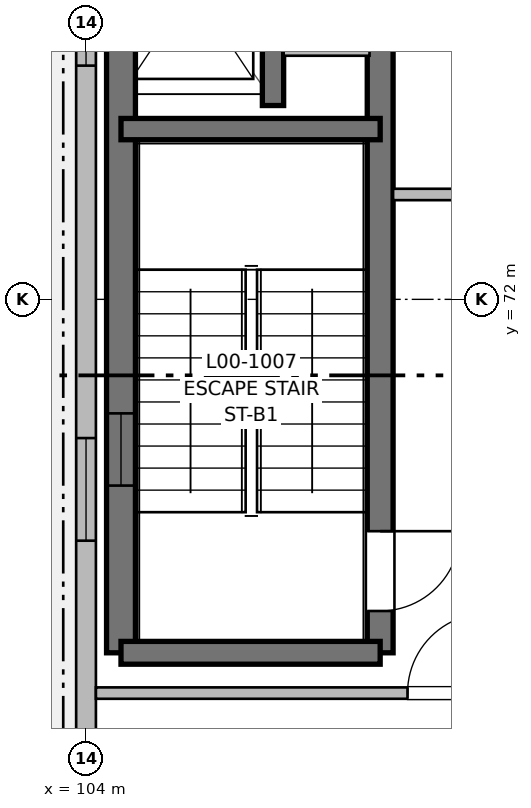
"""IFC4 building model, lengths in metres.
Left out: names, types, materials, properties, quantities, classifications, styles, units other than length and angle.
Written with IfcOpenShell. Run it as: python <this file> out.ifc"""

import sys

from ifc_helpers import new_model, si_unit, direction, frame, frame_2d, origin, place, context, subcontext, project, spatial, rectangle, extrude, element, fill, save


model = new_model("IFC4")
c1 = context("Model", 3, precision=1e-05, world=origin(), true_north=direction((0.0, 1.0)))
c2 = subcontext(c1, "Body", "Model", "MODEL_VIEW")
j1 = project(units=[si_unit("LENGTHUNIT", "METRE"), si_unit("PLANEANGLEUNIT", "RADIAN")], contexts=[c1])
p1 = place(None, origin())
s1 = spatial("IfcSite", under=j1, at=p1, CompositionType="ELEMENT")
p2 = place(p1, origin())
s2 = spatial("IfcBuilding", under=s1, at=p2, CompositionType="ELEMENT")
p3 = place(p2, origin())
s3 = spatial("IfcBuildingStorey", under=s2, at=p3, CompositionType="ELEMENT", Elevation=0.0)
p4 = place(p3, frame((104.46, 67.35, 0.0), z_axis=(0.0, 0.0, 1.0), x_axis=(0.0, 1.0, 0.0)))
e1 = element("IfcWall", 1, at=p4, inside=s3, PredefinedType="SHEAR", context=c2, shape_type="SweptSolid", body=[
    extrude(rectangle(XDim=12.45, YDim=0.38, at=frame_2d((6.225, 0.0))), origin(), (0.0, 0.0, 1.0), 4.16),
])
p5 = place(p4, frame((2.2, 0.0, 1.2)))
e2 = element("IfcOpeningElement", 2, at=p5, cuts=e1, PredefinedType="OPENING", context=c2, shape_type="SweptSolid", body=[
    extrude(rectangle(XDim=0.95, YDim=1.25, at=frame_2d((0.475, 0.625))), frame((0.0, 0.2, 0.0), z_axis=(0.0, -1.0, 0.0), x_axis=(1.0, 0.0, 0.0)), (0.0, 0.0, 1.0), 0.4),
])
p6 = place(p3, frame((107.87, 79.8, 0.0), z_axis=(0.0, 0.0, 1.0), x_axis=(0.0, -1.0, 0.0)))
e3 = element("IfcWall", 3, at=p6, inside=s3, PredefinedType="SHEAR", context=c2, shape_type="SweptSolid", body=[
    extrude(rectangle(XDim=12.45, YDim=0.34, at=frame_2d((6.225, 0.0))), origin(), (0.0, 0.0, 1.0), 4.16),
])
p7 = place(p6, frame((10.85, 0.0, 0.0)))
e4 = element("IfcOpeningElement", 4, at=p7, cuts=e3, PredefinedType="OPENING", context=c2, shape_type="SweptSolid", body=[
    extrude(rectangle(XDim=1.05, YDim=2.15, at=frame_2d((0.525, 1.075))), frame((0.0, 0.18, 0.0), z_axis=(0.0, -1.0, 0.0), x_axis=(1.0, 0.0, 0.0)), (0.0, 0.0, 1.0), 0.36),
])
p8 = place(p3, frame((107.87, 67.35, 0.0), z_axis=(0.0, 0.0, 1.0), x_axis=(-1.0, 0.0, 0.0)))
e5 = element("IfcWall", 5, at=p8, inside=s3, PredefinedType="SHEAR", context=c2, shape_type="SweptSolid", body=[
    extrude(rectangle(XDim=3.41, YDim=0.3, at=frame_2d((1.705, 0.0))), origin(), (0.0, 0.0, 1.0), 4.16),
])
p9 = place(p3, frame((104.46, 74.24, 0.0), z_axis=(0.0, 0.0, 1.0), x_axis=(1.0, 0.0, 0.0)))
e6 = element("IfcWall", 6, at=p9, inside=s3, PredefinedType="SHEAR", context=c2, shape_type="SweptSolid", body=[
    extrude(rectangle(XDim=3.41, YDim=0.28, at=frame_2d((1.705, 0.0))), origin(), (0.0, 0.0, 1.0), 4.16),
])
p10 = place(p3, frame((106.46, 74.55, 0.0), z_axis=(0.0, 0.0, 1.0), x_axis=(0.0, 1.0, 0.0)))
e7 = element("IfcWall", 7, at=p10, inside=s3, PredefinedType="SHEAR", context=c2, shape_type="SweptSolid", body=[
    extrude(rectangle(XDim=5.25, YDim=0.28, at=frame_2d((2.625, 0.0))), origin(), (0.0, 0.0, 1.0), 4.16),
])
p11 = place(p10, frame((1.15, 0.0, 0.0)))
e8 = element("IfcOpeningElement", 8, at=p11, cuts=e7, PredefinedType="OPENING", context=c2, shape_type="SweptSolid", body=[
    extrude(rectangle(XDim=1.0, YDim=2.15, at=frame_2d((0.5, 1.075))), frame((0.0, 0.15, 0.0), z_axis=(0.0, -1.0, 0.0), x_axis=(1.0, 0.0, 0.0)), (0.0, 0.0, 1.0), 0.3),
])
p12 = place(p10, frame((3.85, 0.0, 0.0)))
e9 = element("IfcOpeningElement", 9, at=p12, cuts=e7, PredefinedType="OPENING", context=c2, shape_type="SweptSolid", body=[
    extrude(rectangle(XDim=0.9, YDim=2.15, at=frame_2d((0.45, 1.075))), frame((0.0, 0.15, 0.0), z_axis=(0.0, -1.0, 0.0), x_axis=(1.0, 0.0, 0.0)), (0.0, 0.0, 1.0), 0.3),
])
p13 = place(p3, frame((106.6, 75.28, 0.0), z_axis=(0.0, 0.0, 1.0), x_axis=(1.0, 0.0, 0.0)))
e10 = element("IfcWall", 10, at=p13, inside=s3, PredefinedType="PARTITIONING", context=c2, shape_type="SweptSolid", body=[
    extrude(rectangle(XDim=1.13, YDim=0.15, at=frame_2d((0.565, 0.0))), origin(), (0.0, 0.0, 1.0), 3.91),
])
p14 = place(p3, frame((104.0, 56.0, 0.0), z_axis=(0.0, 0.0, 1.0), x_axis=(0.0, 1.0, 0.0)))
e11 = element("IfcWall", 11, at=p14, inside=s3, PredefinedType="SOLIDWALL", context=c2, shape_type="SweptSolid", body=[
    extrude(rectangle(XDim=36.0, YDim=0.26, at=frame_2d((18.0, 0.0))), origin(), (0.0, 0.0, 1.0), 3.94),
])
p15 = place(p14, frame((3.425, 0.0, 0.95)))
e12 = element("IfcOpeningElement", 12, at=p15, cuts=e11, PredefinedType="OPENING", context=c2, shape_type="SweptSolid", body=[
    extrude(rectangle(XDim=2.15, YDim=1.8, at=frame_2d((1.075, 0.9))), frame((0.0, 0.14, 0.0), z_axis=(0.0, -1.0, 0.0), x_axis=(1.0, 0.0, 0.0)), (0.0, 0.0, 1.0), 0.28),
])
p16 = place(p14, frame((12.825, 0.0, 0.95)))
e13 = element("IfcOpeningElement", 13, at=p16, cuts=e11, PredefinedType="OPENING", context=c2, shape_type="SweptSolid", body=[
    extrude(rectangle(XDim=1.35, YDim=1.3, at=frame_2d((0.675, 0.65))), frame((0.0, 0.14, 0.0), z_axis=(0.0, -1.0, 0.0), x_axis=(1.0, 0.0, 0.0)), (0.0, 0.0, 1.0), 0.28),
])
p17 = place(p14, frame((19.075, 0.0, 0.95)))
e14 = element("IfcOpeningElement", 14, at=p17, cuts=e11, PredefinedType="OPENING", context=c2, shape_type="SweptSolid", body=[
    extrude(rectangle(XDim=2.15, YDim=1.8, at=frame_2d((1.075, 0.9))), frame((0.0, 0.14, 0.0), z_axis=(0.0, -1.0, 0.0), x_axis=(1.0, 0.0, 0.0)), (0.0, 0.0, 1.0), 0.28),
])
p18 = place(p14, frame((30.825, 0.0, 0.95)))
e15 = element("IfcOpeningElement", 15, at=p18, cuts=e11, PredefinedType="OPENING", context=c2, shape_type="SweptSolid", body=[
    extrude(rectangle(XDim=1.35, YDim=1.3, at=frame_2d((0.675, 0.65))), frame((0.0, 0.14, 0.0), z_axis=(0.0, -1.0, 0.0), x_axis=(1.0, 0.0, 0.0)), (0.0, 0.0, 1.0), 0.28),
])
p19 = place(p3, frame((104.13, 66.82, 0.0), z_axis=(0.0, 0.0, 1.0), x_axis=(1.0, 0.0, 0.0)))
e16 = element("IfcWall", 16, at=p19, inside=s3, PredefinedType="PARTITIONING", context=c2, shape_type="SweptSolid", body=[
    extrude(rectangle(XDim=6.59, YDim=0.15, at=frame_2d((3.295, 0.0))), origin(), (0.0, 0.0, 1.0), 3.895),
])
p20 = place(p19, frame((4.1, 0.0, 0.0)))
e17 = element("IfcOpeningElement", 17, at=p20, cuts=e16, PredefinedType="OPENING", context=c2, shape_type="SweptSolid", body=[
    extrude(rectangle(XDim=1.05, YDim=2.15, at=frame_2d((0.525, 1.075))), frame((0.0, 0.085, 0.0), z_axis=(0.0, -1.0, 0.0), x_axis=(1.0, 0.0, 0.0)), (0.0, 0.0, 1.0), 0.17),
])
p21 = place(p3, frame((108.04, 73.38, 0.0), z_axis=(0.0, 0.0, 1.0), x_axis=(1.0, 0.0, 0.0)))
e18 = element("IfcWall", 18, at=p21, inside=s3, PredefinedType="PARTITIONING", context=c2, shape_type="SweptSolid", body=[
    extrude(rectangle(XDim=2.68, YDim=0.15, at=frame_2d((1.34, 0.0))), origin(), (0.0, 0.0, 1.0), 3.895),
])
p22 = place(p7, origin())
e19 = element("IfcDoor", 19, at=p22, inside=s3, OperationType="SINGLE_SWING_LEFT", PredefinedType="DOOR", context=c2, shape_type="SweptSolid", body=[
    extrude(rectangle(XDim=1.05, YDim=2.15, at=frame_2d((0.525, 1.075))), frame((0.0, 0.025, 0.0), z_axis=(0.0, -1.0, 0.0), x_axis=(1.0, 0.0, 0.0)), (0.0, 0.0, 1.0), 0.05),
])
fill(e4, e19)
p23 = place(p5, origin())
e20 = element("IfcWindow", 20, at=p23, inside=s3, PartitioningType="SINGLE_PANEL", PredefinedType="WINDOW", context=c2, shape_type="SweptSolid", body=[
    extrude(rectangle(XDim=0.95, YDim=1.25, at=frame_2d((0.475, 0.625))), frame((0.0, 0.03, 0.0), z_axis=(0.0, -1.0, 0.0), x_axis=(1.0, 0.0, 0.0)), (0.0, 0.0, 1.0), 0.06),
])
fill(e2, e20)
p24 = place(p16, origin())
e21 = element("IfcWindow", 21, at=p24, inside=s3, PartitioningType="SINGLE_PANEL", PredefinedType="WINDOW", context=c2, shape_type="SweptSolid", body=[
    extrude(rectangle(XDim=1.35, YDim=1.3, at=frame_2d((0.675, 0.65))), frame((0.0, 0.03, 0.0), z_axis=(0.0, -1.0, 0.0), x_axis=(1.0, 0.0, 0.0)), (0.0, 0.0, 1.0), 0.06),
])
fill(e13, e21)
p25 = place(p17, origin())
e22 = element("IfcWindow", 22, at=p25, inside=s3, PartitioningType="SINGLE_PANEL", PredefinedType="WINDOW", context=c2, shape_type="SweptSolid", body=[
    extrude(rectangle(XDim=2.15, YDim=1.8, at=frame_2d((1.075, 0.9))), frame((0.0, 0.03, 0.0), z_axis=(0.0, -1.0, 0.0), x_axis=(1.0, 0.0, 0.0)), (0.0, 0.0, 1.0), 0.06),
])
fill(e14, e22)
p26 = place(p20, origin())
e23 = element("IfcDoor", 23, at=p26, inside=s3, OperationType="SINGLE_SWING_RIGHT", PredefinedType="DOOR", context=c2, shape_type="SweptSolid", body=[
    extrude(rectangle(XDim=1.05, YDim=2.15, at=frame_2d((0.525, 1.075))), frame((0.0, 0.025, 0.0), z_axis=(0.0, -1.0, 0.0), x_axis=(1.0, 0.0, 0.0)), (0.0, 0.0, 1.0), 0.05),
])
fill(e17, e23)
save(model, sys.argv[1])
